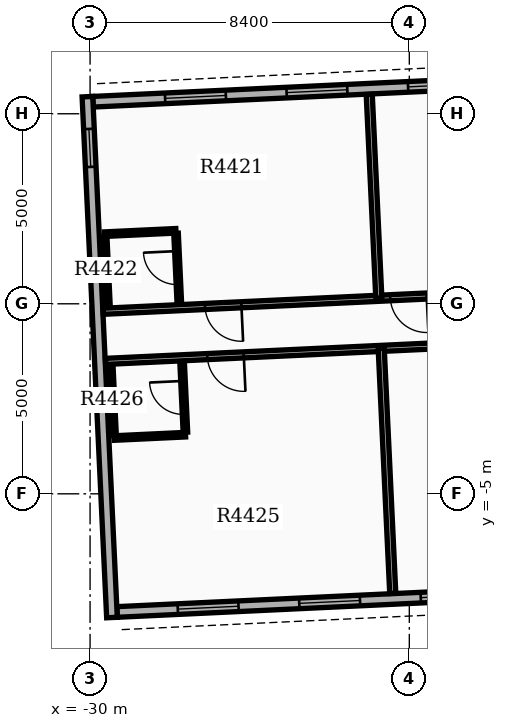
"""IFC4 building model, lengths in metres.
Left out: names, types, materials, properties, quantities, classifications, styles, units other than length and angle.
Written with IfcOpenShell. Run it as: python <this file> out.ifc"""

import sys

from ifc_helpers import new_model, si_unit, direction, frame, frame_2d, origin, place, context, subcontext, project, spatial, rectangle, extrude, element, fill, save


model = new_model("IFC4")
c1 = context("Model", 3, precision=1e-05, world=origin(), true_north=direction((0.0, 1.0)))
c2 = subcontext(c1, "Body", "Model", "MODEL_VIEW")
j1 = project(units=[si_unit("LENGTHUNIT", "METRE"), si_unit("PLANEANGLEUNIT", "RADIAN")], contexts=[c1])
p1 = place(None, origin())
s1 = spatial("IfcSite", under=j1, at=p1, CompositionType="ELEMENT")
p2 = place(p1, origin())
s2 = spatial("IfcBuilding", under=s1, at=p2, CompositionType="ELEMENT")
p3 = place(p2, frame((0.0, 0.0, 277.2)))
s3 = spatial("IfcBuildingStorey", under=s2, at=p3, CompositionType="ELEMENT", Elevation=277.2)
p4 = place(p3, frame((-15.24, 6.009, 0.0), z_axis=(0.0, 0.0, 1.0), x_axis=(-0.998890124275, -0.047101163748, 0.0)))
e1 = element("IfcWall", 1, at=p4, inside=s3, PredefinedType="STANDARD", context=c2, shape_type="SweptSolid", body=[
    extrude(rectangle(XDim=14.7, YDim=0.28, at=frame_2d((7.35, 0.0))), origin(), (0.0, 0.0, 1.0), 3.18),
])
p5 = place(p4, frame((1.6, 0.0, 0.8)))
e2 = element("IfcOpeningElement", 2, at=p5, cuts=e1, PredefinedType="OPENING", context=c2, shape_type="SweptSolid", body=[
    extrude(rectangle(XDim=1.6, YDim=1.7, at=frame_2d((0.8, 0.85))), frame((0.0, 0.15, 0.0), z_axis=(0.0, -1.0, 0.0), x_axis=(1.0, 0.0, 0.0)), (0.0, 0.0, 1.0), 0.3),
])
p6 = place(p4, frame((4.8, 0.0, 0.8)))
e3 = element("IfcOpeningElement", 3, at=p6, cuts=e1, PredefinedType="OPENING", context=c2, shape_type="SweptSolid", body=[
    extrude(rectangle(XDim=1.6, YDim=1.7, at=frame_2d((0.8, 0.85))), frame((0.0, 0.15, 0.0), z_axis=(0.0, -1.0, 0.0), x_axis=(1.0, 0.0, 0.0)), (0.0, 0.0, 1.0), 0.3),
])
p7 = place(p4, frame((8.0, 0.0, 0.8)))
e4 = element("IfcOpeningElement", 4, at=p7, cuts=e1, PredefinedType="OPENING", context=c2, shape_type="SweptSolid", body=[
    extrude(rectangle(XDim=1.6, YDim=1.7, at=frame_2d((0.8, 0.85))), frame((0.0, 0.15, 0.0), z_axis=(0.0, -1.0, 0.0), x_axis=(1.0, 0.0, 0.0)), (0.0, 0.0, 1.0), 0.3),
])
p8 = place(p4, frame((11.2, 0.0, 0.8)))
e5 = element("IfcOpeningElement", 5, at=p8, cuts=e1, PredefinedType="OPENING", context=c2, shape_type="SweptSolid", body=[
    extrude(rectangle(XDim=1.6, YDim=1.7, at=frame_2d((0.8, 0.85))), frame((0.0, 0.15, 0.0), z_axis=(0.0, -1.0, 0.0), x_axis=(1.0, 0.0, 0.0)), (0.0, 0.0, 1.0), 0.3),
])
p9 = place(p3, frame((-29.291, -8.109, 0.0), z_axis=(0.0, 0.0, 1.0), x_axis=(0.998889342735, 0.047117735191, 0.0)))
e6 = element("IfcWall", 6, at=p9, inside=s3, PredefinedType="STANDARD", context=c2, shape_type="SweptSolid", body=[
    extrude(rectangle(XDim=14.7, YDim=0.28, at=frame_2d((7.35, 0.0))), origin(), (0.0, 0.0, 1.0), 3.18),
])
p10 = place(p9, frame((1.6, 0.0, 0.8)))
e7 = element("IfcOpeningElement", 7, at=p10, cuts=e6, PredefinedType="OPENING", context=c2, shape_type="SweptSolid", body=[
    extrude(rectangle(XDim=1.6, YDim=1.7, at=frame_2d((0.8, 0.85))), frame((0.0, 0.15, 0.0), z_axis=(0.0, -1.0, 0.0), x_axis=(1.0, 0.0, 0.0)), (0.0, 0.0, 1.0), 0.3),
])
p11 = place(p9, frame((4.8, 0.0, 0.8)))
e8 = element("IfcOpeningElement", 8, at=p11, cuts=e6, PredefinedType="OPENING", context=c2, shape_type="SweptSolid", body=[
    extrude(rectangle(XDim=1.6, YDim=1.7, at=frame_2d((0.8, 0.85))), frame((0.0, 0.15, 0.0), z_axis=(0.0, -1.0, 0.0), x_axis=(1.0, 0.0, 0.0)), (0.0, 0.0, 1.0), 0.3),
])
p12 = place(p9, frame((8.0, 0.0, 0.8)))
e9 = element("IfcOpeningElement", 9, at=p12, cuts=e6, PredefinedType="OPENING", context=c2, shape_type="SweptSolid", body=[
    extrude(rectangle(XDim=1.6, YDim=1.7, at=frame_2d((0.8, 0.85))), frame((0.0, 0.15, 0.0), z_axis=(0.0, -1.0, 0.0), x_axis=(1.0, 0.0, 0.0)), (0.0, 0.0, 1.0), 0.3),
])
p13 = place(p9, frame((11.2, 0.0, 0.8)))
e10 = element("IfcOpeningElement", 10, at=p13, cuts=e6, PredefinedType="OPENING", context=c2, shape_type="SweptSolid", body=[
    extrude(rectangle(XDim=1.6, YDim=1.7, at=frame_2d((0.8, 0.85))), frame((0.0, 0.15, 0.0), z_axis=(0.0, -1.0, 0.0), x_axis=(1.0, 0.0, 0.0)), (0.0, 0.0, 1.0), 0.3),
])
p14 = place(p3, frame((-30.07, 5.45, 0.0), z_axis=(0.0, 0.0, 1.0), x_axis=(0.047101845086, -0.998890092147, 0.0)))
e11 = element("IfcWall", 11, at=p14, inside=s3, PredefinedType="STANDARD", context=c2, shape_type="SweptSolid", body=[
    extrude(rectangle(XDim=13.72, YDim=0.28, at=frame_2d((6.86, 0.0))), origin(), (0.0, 0.0, 1.0), 3.18),
])
p15 = place(p14, frame((0.85, 0.0, 0.85)))
e12 = element("IfcOpeningElement", 12, at=p15, cuts=e11, PredefinedType="OPENING", context=c2, shape_type="SweptSolid", body=[
    extrude(rectangle(XDim=1.0, YDim=1.5, at=frame_2d((0.5, 0.75))), frame((0.0, 0.15, 0.0), z_axis=(0.0, -1.0, 0.0), x_axis=(1.0, 0.0, 0.0)), (0.0, 0.0, 1.0), 0.3),
])
p16 = place(p3, frame((-14.66, 0.51, 0.0), z_axis=(0.0, 0.0, 1.0), x_axis=(-0.998889487459, -0.047114666968, 0.0)))
e13 = element("IfcWall", 13, at=p16, inside=s3, PredefinedType="PARTITIONING", context=c2, shape_type="SweptSolid", body=[
    extrude(rectangle(XDim=15.012, YDim=0.16, at=frame_2d((7.506, 0.0))), origin(), (0.0, 0.0, 1.0), 3.17),
])
p17 = place(p16, frame((6.49, 0.0, 0.0)))
e14 = element("IfcOpeningElement", 14, at=p17, cuts=e13, PredefinedType="OPENING", context=c2, shape_type="SweptSolid", body=[
    extrude(rectangle(XDim=0.96, YDim=2.15, at=frame_2d((0.48, 1.075))), frame((0.0, 0.09, 0.0), z_axis=(0.0, -1.0, 0.0), x_axis=(1.0, 0.0, 0.0)), (0.0, 0.0, 1.0), 0.18),
])
p18 = place(p16, frame((11.371, 0.0, 0.0)))
e15 = element("IfcOpeningElement", 15, at=p18, cuts=e13, PredefinedType="OPENING", context=c2, shape_type="SweptSolid", body=[
    extrude(rectangle(XDim=0.96, YDim=2.15, at=frame_2d((0.48, 1.075))), frame((0.0, 0.09, 0.0), z_axis=(0.0, -1.0, 0.0), x_axis=(1.0, 0.0, 0.0)), (0.0, 0.0, 1.0), 0.18),
])
p19 = place(p3, frame((-22.402, 0.145, 0.0), z_axis=(0.0, 0.0, 1.0), x_axis=(-0.047128973049, 0.998888812581, 0.0)))
e16 = element("IfcWall", 16, at=p19, inside=s3, PredefinedType="PARTITIONING", context=c2, shape_type="SweptSolid", body=[
    extrude(rectangle(XDim=5.372, YDim=0.16, at=frame_2d((2.686, 0.0))), origin(), (0.0, 0.0, 1.0), 3.17),
])
p20 = place(p3, frame((-27.653, 0.037, 0.0), z_axis=(0.0, 0.0, 1.0), x_axis=(-0.047080807099, 0.998891083954, 0.0)))
e17 = element("IfcWall", 17, at=p20, inside=s3, PredefinedType="PARTITIONING", context=c2, shape_type="SweptSolid", body=[
    extrude(rectangle(XDim=1.82, YDim=0.12, at=frame_2d((0.91, 0.0))), origin(), (0.0, 0.0, 1.0), 3.17),
])
p21 = place(p20, frame((0.47, 0.0, 0.0)))
e18 = element("IfcOpeningElement", 18, at=p21, cuts=e17, PredefinedType="OPENING", context=c2, shape_type="SweptSolid", body=[
    extrude(rectangle(XDim=0.88, YDim=2.1, at=frame_2d((0.44, 1.05))), frame((0.0, 0.07, 0.0), z_axis=(0.0, -1.0, 0.0), x_axis=(1.0, 0.0, 0.0)), (0.0, 0.0, 1.0), 0.14),
])
p22 = place(p3, frame((-29.531, -0.051, 0.0), z_axis=(0.0, 0.0, 1.0), x_axis=(-0.047087116047, 0.998890786574, 0.0)))
e19 = element("IfcWall", 19, at=p22, inside=s3, PredefinedType="PARTITIONING", context=c2, shape_type="SweptSolid", body=[
    extrude(rectangle(XDim=1.82, YDim=0.12, at=frame_2d((0.91, 0.0))), origin(), (0.0, 0.0, 1.0), 3.17),
])
p23 = place(p3, frame((-27.741, 1.92, 0.0), z_axis=(0.0, 0.0, 1.0), x_axis=(-0.998888319371, -0.047139425368, 0.0)))
e20 = element("IfcWall", 20, at=p23, inside=s3, PredefinedType="PARTITIONING", context=c2, shape_type="SweptSolid", body=[
    extrude(rectangle(XDim=1.88, YDim=0.12, at=frame_2d((0.94, 0.0))), origin(), (0.0, 0.0, 1.0), 3.17),
])
p24 = place(p3, frame((-14.598, -0.809, 0.0), z_axis=(0.0, 0.0, 1.0), x_axis=(-0.998890288791, -0.047097674677, 0.0)))
e21 = element("IfcWall", 21, at=p24, inside=s3, PredefinedType="PARTITIONING", context=c2, shape_type="SweptSolid", body=[
    extrude(rectangle(XDim=15.012, YDim=0.16, at=frame_2d((7.506, 0.0))), origin(), (0.0, 0.0, 1.0), 3.17),
])
p25 = place(p24, frame((2.755, 0.0, 0.0)))
e22 = element("IfcOpeningElement", 22, at=p25, cuts=e21, PredefinedType="OPENING", context=c2, shape_type="SweptSolid", body=[
    extrude(rectangle(XDim=0.96, YDim=2.15, at=frame_2d((0.48, 1.075))), frame((0.0, 0.09, 0.0), z_axis=(0.0, -1.0, 0.0), x_axis=(1.0, 0.0, 0.0)), (0.0, 0.0, 1.0), 0.18),
])
p26 = place(p24, frame((11.371, 0.0, 0.0)))
e23 = element("IfcOpeningElement", 23, at=p26, cuts=e21, PredefinedType="OPENING", context=c2, shape_type="SweptSolid", body=[
    extrude(rectangle(XDim=0.96, YDim=2.15, at=frame_2d((0.48, 1.075))), frame((0.0, 0.09, 0.0), z_axis=(0.0, -1.0, 0.0), x_axis=(1.0, 0.0, 0.0)), (0.0, 0.0, 1.0), 0.18),
])
p27 = place(p3, frame((-22.34, -1.174, 0.0), z_axis=(0.0, 0.0, 1.0), x_axis=(0.047110298825, -0.998889693482, 0.0)))
e24 = element("IfcWall", 24, at=p27, inside=s3, PredefinedType="PARTITIONING", context=c2, shape_type="SweptSolid", body=[
    extrude(rectangle(XDim=6.452, YDim=0.16, at=frame_2d((3.226, 0.0))), origin(), (0.0, 0.0, 1.0), 3.17),
])
p28 = place(p3, frame((-27.491, -3.379, 0.0), z_axis=(0.0, 0.0, 1.0), x_axis=(-0.047080807099, 0.998891083954, 0.0)))
e25 = element("IfcWall", 25, at=p28, inside=s3, PredefinedType="PARTITIONING", context=c2, shape_type="SweptSolid", body=[
    extrude(rectangle(XDim=1.82, YDim=0.12, at=frame_2d((0.91, 0.0))), origin(), (0.0, 0.0, 1.0), 3.17),
])
p29 = place(p28, frame((0.47, 0.0, 0.0)))
e26 = element("IfcOpeningElement", 26, at=p29, cuts=e25, PredefinedType="OPENING", context=c2, shape_type="SweptSolid", body=[
    extrude(rectangle(XDim=0.88, YDim=2.1, at=frame_2d((0.44, 1.05))), frame((0.0, 0.07, 0.0), z_axis=(0.0, -1.0, 0.0), x_axis=(1.0, 0.0, 0.0)), (0.0, 0.0, 1.0), 0.14),
])
p30 = place(p3, frame((-29.369, -3.467, 0.0), z_axis=(0.0, 0.0, 1.0), x_axis=(-0.047087116047, 0.998890786574, 0.0)))
e27 = element("IfcWall", 27, at=p30, inside=s3, PredefinedType="PARTITIONING", context=c2, shape_type="SweptSolid", body=[
    extrude(rectangle(XDim=1.82, YDim=0.12, at=frame_2d((0.91, 0.0))), origin(), (0.0, 0.0, 1.0), 3.17),
])
p31 = place(p3, frame((-27.488, -3.444, 0.0), z_axis=(0.0, 0.0, 1.0), x_axis=(-0.998888319371, -0.047139425368, 0.0)))
e28 = element("IfcWall", 28, at=p31, inside=s3, PredefinedType="PARTITIONING", context=c2, shape_type="SweptSolid", body=[
    extrude(rectangle(XDim=1.88, YDim=0.12, at=frame_2d((0.94, 0.0))), origin(), (0.0, 0.0, 1.0), 3.17),
])
p32 = place(p6, origin())
e29 = element("IfcWindow", 29, at=p32, inside=s3, PartitioningType="SINGLE_PANEL", PredefinedType="WINDOW", context=c2, shape_type="SweptSolid", body=[
    extrude(rectangle(XDim=1.6, YDim=1.7, at=frame_2d((0.8, 0.85))), frame((0.0, 0.03, 0.0), z_axis=(0.0, -1.0, 0.0), x_axis=(1.0, 0.0, 0.0)), (0.0, 0.0, 1.0), 0.06),
])
fill(e3, e29)
p33 = place(p7, origin())
e30 = element("IfcWindow", 30, at=p33, inside=s3, PartitioningType="SINGLE_PANEL", PredefinedType="WINDOW", context=c2, shape_type="SweptSolid", body=[
    extrude(rectangle(XDim=1.6, YDim=1.7, at=frame_2d((0.8, 0.85))), frame((0.0, 0.03, 0.0), z_axis=(0.0, -1.0, 0.0), x_axis=(1.0, 0.0, 0.0)), (0.0, 0.0, 1.0), 0.06),
])
fill(e4, e30)
p34 = place(p8, origin())
e31 = element("IfcWindow", 31, at=p34, inside=s3, PartitioningType="SINGLE_PANEL", PredefinedType="WINDOW", context=c2, shape_type="SweptSolid", body=[
    extrude(rectangle(XDim=1.6, YDim=1.7, at=frame_2d((0.8, 0.85))), frame((0.0, 0.03, 0.0), z_axis=(0.0, -1.0, 0.0), x_axis=(1.0, 0.0, 0.0)), (0.0, 0.0, 1.0), 0.06),
])
fill(e5, e31)
p35 = place(p10, origin())
e32 = element("IfcWindow", 32, at=p35, inside=s3, PartitioningType="SINGLE_PANEL", PredefinedType="WINDOW", context=c2, shape_type="SweptSolid", body=[
    extrude(rectangle(XDim=1.6, YDim=1.7, at=frame_2d((0.8, 0.85))), frame((0.0, 0.03, 0.0), z_axis=(0.0, -1.0, 0.0), x_axis=(1.0, 0.0, 0.0)), (0.0, 0.0, 1.0), 0.06),
])
fill(e7, e32)
p36 = place(p11, origin())
e33 = element("IfcWindow", 33, at=p36, inside=s3, PartitioningType="SINGLE_PANEL", PredefinedType="WINDOW", context=c2, shape_type="SweptSolid", body=[
    extrude(rectangle(XDim=1.6, YDim=1.7, at=frame_2d((0.8, 0.85))), frame((0.0, 0.03, 0.0), z_axis=(0.0, -1.0, 0.0), x_axis=(1.0, 0.0, 0.0)), (0.0, 0.0, 1.0), 0.06),
])
fill(e8, e33)
p37 = place(p12, origin())
e34 = element("IfcWindow", 34, at=p37, inside=s3, PartitioningType="SINGLE_PANEL", PredefinedType="WINDOW", context=c2, shape_type="SweptSolid", body=[
    extrude(rectangle(XDim=1.6, YDim=1.7, at=frame_2d((0.8, 0.85))), frame((0.0, 0.03, 0.0), z_axis=(0.0, -1.0, 0.0), x_axis=(1.0, 0.0, 0.0)), (0.0, 0.0, 1.0), 0.06),
])
fill(e9, e34)
p38 = place(p15, origin())
e35 = element("IfcWindow", 35, at=p38, inside=s3, PartitioningType="SINGLE_PANEL", PredefinedType="WINDOW", context=c2, shape_type="SweptSolid", body=[
    extrude(rectangle(XDim=1.0, YDim=1.5, at=frame_2d((0.5, 0.75))), frame((0.0, 0.03, 0.0), z_axis=(0.0, -1.0, 0.0), x_axis=(1.0, 0.0, 0.0)), (0.0, 0.0, 1.0), 0.06),
])
fill(e12, e35)
p39 = place(p17, origin())
e36 = element("IfcDoor", 36, at=p39, inside=s3, OperationType="SINGLE_SWING_LEFT", PredefinedType="DOOR", context=c2, shape_type="SweptSolid", body=[
    extrude(rectangle(XDim=0.96, YDim=2.15, at=frame_2d((0.48, 1.075))), frame((0.0, 0.025, 0.0), z_axis=(0.0, -1.0, 0.0), x_axis=(1.0, 0.0, 0.0)), (0.0, 0.0, 1.0), 0.05),
])
fill(e14, e36)
p40 = place(p18, origin())
e37 = element("IfcDoor", 37, at=p40, inside=s3, OperationType="SINGLE_SWING_LEFT", PredefinedType="DOOR", context=c2, shape_type="SweptSolid", body=[
    extrude(rectangle(XDim=0.96, YDim=2.15, at=frame_2d((0.48, 1.075))), frame((0.0, 0.025, 0.0), z_axis=(0.0, -1.0, 0.0), x_axis=(1.0, 0.0, 0.0)), (0.0, 0.0, 1.0), 0.05),
])
fill(e15, e37)
p41 = place(p21, origin())
e38 = element("IfcDoor", 38, at=p41, inside=s3, OperationType="SINGLE_SWING_RIGHT", PredefinedType="DOOR", context=c2, shape_type="SweptSolid", body=[
    extrude(rectangle(XDim=0.88, YDim=2.1, at=frame_2d((0.44, 1.05))), frame((0.0, 0.025, 0.0), z_axis=(0.0, -1.0, 0.0), x_axis=(1.0, 0.0, 0.0)), (0.0, 0.0, 1.0), 0.05),
])
fill(e18, e38)
p42 = place(p26, origin())
e39 = element("IfcDoor", 39, at=p42, inside=s3, OperationType="SINGLE_SWING_LEFT", PredefinedType="DOOR", context=c2, shape_type="SweptSolid", body=[
    extrude(rectangle(XDim=0.96, YDim=2.15, at=frame_2d((0.48, 1.075))), frame((0.0, 0.025, 0.0), z_axis=(0.0, -1.0, 0.0), x_axis=(1.0, 0.0, 0.0)), (0.0, 0.0, 1.0), 0.05),
])
fill(e23, e39)
p43 = place(p29, origin())
e40 = element("IfcDoor", 40, at=p43, inside=s3, OperationType="SINGLE_SWING_RIGHT", PredefinedType="DOOR", context=c2, shape_type="SweptSolid", body=[
    extrude(rectangle(XDim=0.88, YDim=2.1, at=frame_2d((0.44, 1.05))), frame((0.0, 0.025, 0.0), z_axis=(0.0, -1.0, 0.0), x_axis=(1.0, 0.0, 0.0)), (0.0, 0.0, 1.0), 0.05),
])
fill(e26, e40)
save(model, sys.argv[1])
